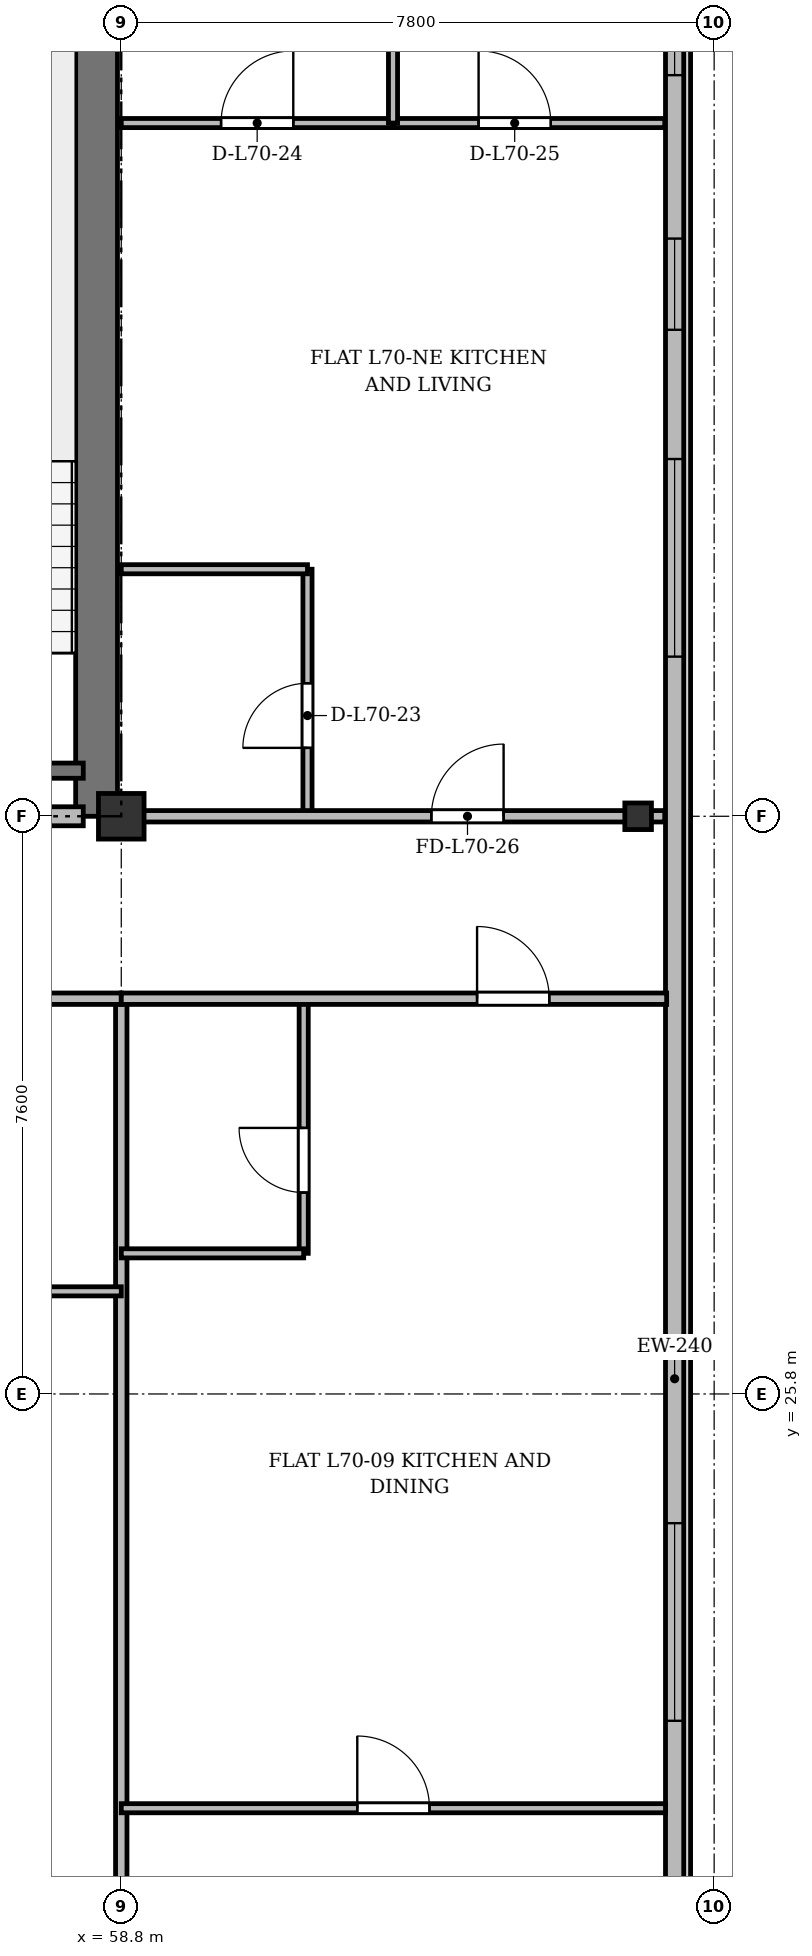
"""IFC4 building model, lengths in metres.
Left out: names, types, materials, properties, quantities, classifications, styles, units other than length and angle.
Written with IfcOpenShell. Run it as: python <this file> out.ifc"""

import sys

from ifc_helpers import new_model, si_unit, direction, frame, frame_2d, origin, origin_2d, place, context, subcontext, project, spatial, rectangle, i_section, extrude, source, transform, mapped, element, fill, save


model = new_model("IFC4")
c1 = context("Model", 3, precision=1e-05, world=origin(), true_north=direction((0.0, 1.0)))
c2 = subcontext(c1, "Body", "Model", "MODEL_VIEW")
j1 = project(units=[si_unit("LENGTHUNIT", "METRE"), si_unit("PLANEANGLEUNIT", "RADIAN")], contexts=[c1])
p1 = place(None, origin())
s1 = spatial("IfcSite", under=j1, at=p1, CompositionType="ELEMENT")
p2 = place(p1, origin())
s2 = spatial("IfcBuilding", under=s1, at=p2, CompositionType="ELEMENT")
p3 = place(p2, frame((0.0, 0.0, 270.3)))
s3 = spatial("IfcBuildingStorey", under=s2, at=p3, CompositionType="ELEMENT", Elevation=270.3)
m1 = source(origin(), c2, "Body", "SweptSolid", [
    extrude(rectangle(XDim=0.6, YDim=0.6, at=origin_2d()), origin(), (0.0, 0.0, 1.0), 3.6),
])
p4 = place(p3, frame((58.8, 33.4, 0.0), z_axis=(0.0, 0.0, 1.0), x_axis=(1.0, 0.0, 0.0)))
e1 = element("IfcColumn", 1, at=p4, inside=s3, PredefinedType="COLUMN", context=c2, shape_type="MappedRepresentation", body=[
    mapped(m1, transform((0.0, 0.0, 0.0), x_axis=(1.0, 0.0, 0.0), y_axis=(0.0, 1.0, 0.0), z_axis=(0.0, 0.0, 1.0), scale=1.0)),
])
m2 = source(origin(), c2, "Body", "SweptSolid", [
    extrude(i_section(OverallWidth=0.35, OverallDepth=0.35, WebThickness=0.018, FlangeThickness=0.028, at=origin_2d()), origin(), (0.0, 0.0, 1.0), 3.6),
])
p5 = place(p3, frame((65.6, 33.4, 0.0), z_axis=(0.0, 0.0, 1.0), x_axis=(1.0, 0.0, 0.0)))
e2 = element("IfcColumn", 2, at=p5, inside=s3, PredefinedType="COLUMN", context=c2, shape_type="MappedRepresentation", body=[
    mapped(m2, transform((0.0, 0.0, 0.0), x_axis=(1.0, 0.0, 0.0), y_axis=(0.0, 1.0, 0.0), z_axis=(0.0, 0.0, 1.0), scale=1.0)),
])
p6 = place(p3, frame((66.08, 45.5, 0.0), z_axis=(0.0, 0.0, 1.0), x_axis=(0.0, -1.0, 0.0)))
e3 = element("IfcWall", 3, at=p6, inside=s3, PredefinedType="SOLIDWALL", context=c2, shape_type="SweptSolid", body=[
    extrude(rectangle(XDim=39.0, YDim=0.24, at=frame_2d((19.5, 0.0))), origin(), (0.0, 0.0, 1.0), 3.37),
])
p7 = place(p6, frame((36.35, 0.0, 0.92)))
e4 = element("IfcOpeningElement", 4, at=p7, cuts=e3, PredefinedType="OPENING", context=c2, shape_type="SweptSolid", body=[
    extrude(rectangle(XDim=1.2, YDim=1.65, at=frame_2d((0.6, 0.825))), frame((0.0, 0.13, 0.0), z_axis=(0.0, -1.0, 0.0), x_axis=(1.0, 0.0, 0.0)), (0.0, 0.0, 1.0), 0.26),
])
p8 = place(p6, frame((32.8, 0.0, 0.92)))
e5 = element("IfcOpeningElement", 5, at=p8, cuts=e3, PredefinedType="OPENING", context=c2, shape_type="SweptSolid", body=[
    extrude(rectangle(XDim=2.6, YDim=1.9, at=frame_2d((1.3, 0.95))), frame((0.0, 0.13, 0.0), z_axis=(0.0, -1.0, 0.0), x_axis=(1.0, 0.0, 0.0)), (0.0, 0.0, 1.0), 0.26),
])
p9 = place(p6, frame((28.6, 0.0, 0.92)))
e6 = element("IfcOpeningElement", 6, at=p9, cuts=e3, PredefinedType="OPENING", context=c2, shape_type="SweptSolid", body=[
    extrude(rectangle(XDim=2.6, YDim=1.9, at=frame_2d((1.3, 0.95))), frame((0.0, 0.13, 0.0), z_axis=(0.0, -1.0, 0.0), x_axis=(1.0, 0.0, 0.0)), (0.0, 0.0, 1.0), 0.26),
])
p10 = place(p6, frame((21.4, 0.0, 0.92)))
e7 = element("IfcOpeningElement", 7, at=p10, cuts=e3, PredefinedType="OPENING", context=c2, shape_type="SweptSolid", body=[
    extrude(rectangle(XDim=2.6, YDim=1.9, at=frame_2d((1.3, 0.95))), frame((0.0, 0.13, 0.0), z_axis=(0.0, -1.0, 0.0), x_axis=(1.0, 0.0, 0.0)), (0.0, 0.0, 1.0), 0.26),
])
p11 = place(p6, frame((7.4, 0.0, 0.92)))
e8 = element("IfcOpeningElement", 8, at=p11, cuts=e3, PredefinedType="OPENING", context=c2, shape_type="SweptSolid", body=[
    extrude(rectangle(XDim=2.6, YDim=1.9, at=frame_2d((1.3, 0.95))), frame((0.0, 0.13, 0.0), z_axis=(0.0, -1.0, 0.0), x_axis=(1.0, 0.0, 0.0)), (0.0, 0.0, 1.0), 0.26),
])
p12 = place(p6, frame((4.5, 0.0, 0.92)))
e9 = element("IfcOpeningElement", 9, at=p12, cuts=e3, PredefinedType="OPENING", context=c2, shape_type="SweptSolid", body=[
    extrude(rectangle(XDim=1.2, YDim=1.65, at=frame_2d((0.6, 0.825))), frame((0.0, 0.13, 0.0), z_axis=(0.0, -1.0, 0.0), x_axis=(1.0, 0.0, 0.0)), (0.0, 0.0, 1.0), 0.26),
])
p13 = place(p6, frame((1.15, 0.0, 0.92)))
e10 = element("IfcOpeningElement", 10, at=p13, cuts=e3, PredefinedType="OPENING", context=c2, shape_type="SweptSolid", body=[
    extrude(rectangle(XDim=1.2, YDim=1.65, at=frame_2d((0.6, 0.825))), frame((0.0, 0.13, 0.0), z_axis=(0.0, -1.0, 0.0), x_axis=(1.0, 0.0, 0.0)), (0.0, 0.0, 1.0), 0.26),
])
p14 = place(p3, frame((58.475, 33.4, 0.0), z_axis=(0.0, 0.0, 1.0), x_axis=(0.0, 1.0, 0.0)))
e11 = element("IfcWall", 11, at=p14, inside=s3, PredefinedType="SHEAR", context=c2, shape_type="SweptSolid", body=[
    extrude(rectangle(XDim=11.55, YDim=0.55, at=frame_2d((5.775, 0.0))), origin(), (0.0, 0.0, 1.0), 3.37),
])
p15 = place(p3, frame((54.9, 34.0, 0.0), z_axis=(0.0, 0.0, 1.0), x_axis=(1.0, 0.0, 0.0)))
e12 = element("IfcWall", 12, at=p15, inside=s3, PredefinedType="SHEAR", context=c2, shape_type="SweptSolid", body=[
    extrude(rectangle(XDim=3.4, YDim=0.2, at=frame_2d((1.7, 0.0))), origin(), (0.0, 0.0, 1.0), 3.37),
])
p16 = place(p3, frame((47.15, 33.4, 0.0), z_axis=(0.0, 0.0, 1.0), x_axis=(1.0, 0.0, 0.0)))
e13 = element("IfcWall", 13, at=p16, inside=s3, PredefinedType="PARTITIONING", context=c2, shape_type="SweptSolid", body=[
    extrude(rectangle(XDim=11.15, YDim=0.25, at=frame_2d((5.575, 0.0))), origin(), (0.0, 0.0, 1.0), 2.92),
])
p17 = place(p16, frame((0.7, 0.0, 0.0)))
e14 = element("IfcOpeningElement", 14, at=p17, cuts=e13, PredefinedType="OPENING", context=c2, shape_type="SweptSolid", body=[
    extrude(rectangle(XDim=0.95, YDim=2.15, at=frame_2d((0.475, 1.075))), frame((0.0, 0.135, 0.0), z_axis=(0.0, -1.0, 0.0), x_axis=(1.0, 0.0, 0.0)), (0.0, 0.0, 1.0), 0.27),
])
p18 = place(p16, frame((6.0, 0.0, 0.0)))
e15 = element("IfcOpeningElement", 15, at=p18, cuts=e13, PredefinedType="OPENING", context=c2, shape_type="SweptSolid", body=[
    extrude(rectangle(XDim=1.2, YDim=2.15, at=frame_2d((0.6, 1.075))), frame((0.0, 0.135, 0.0), z_axis=(0.0, -1.0, 0.0), x_axis=(1.0, 0.0, 0.0)), (0.0, 0.0, 1.0), 0.27),
])
p19 = place(p3, frame((61.25, 33.4, 0.0), z_axis=(0.0, 0.0, 1.0), x_axis=(0.0, 1.0, 0.0)))
e16 = element("IfcWall", 16, at=p19, inside=s3, PredefinedType="PARTITIONING", context=c2, shape_type="SweptSolid", body=[
    extrude(rectangle(XDim=3.25, YDim=0.12, at=frame_2d((1.625, 0.0))), origin(), (0.0, 0.0, 1.0), 2.92),
])
p20 = place(p19, frame((0.9, 0.0, 0.0)))
e17 = element("IfcOpeningElement", 17, at=p20, cuts=e16, PredefinedType="OPENING", context=c2, shape_type="SweptSolid", body=[
    extrude(rectangle(XDim=0.85, YDim=2.1, at=frame_2d((0.425, 1.05))), frame((0.0, 0.07, 0.0), z_axis=(0.0, -1.0, 0.0), x_axis=(1.0, 0.0, 0.0)), (0.0, 0.0, 1.0), 0.14),
])
p21 = place(p3, frame((58.8, 36.65, 0.0), z_axis=(0.0, 0.0, 1.0), x_axis=(1.0, 0.0, 0.0)))
e18 = element("IfcWall", 18, at=p21, inside=s3, PredefinedType="PARTITIONING", context=c2, shape_type="SweptSolid", body=[
    extrude(rectangle(XDim=2.45, YDim=0.12, at=frame_2d((1.225, 0.0))), origin(), (0.0, 0.0, 1.0), 2.87),
])
p22 = place(p3, frame((58.8, 42.52, 0.0), z_axis=(0.0, 0.0, 1.0), x_axis=(1.0, 0.0, 0.0)))
e19 = element("IfcWall", 19, at=p22, inside=s3, PredefinedType="PARTITIONING", context=c2, shape_type="SweptSolid", body=[
    extrude(rectangle(XDim=3.575, YDim=0.12, at=frame_2d((1.788, 0.0))), origin(), (0.0, 0.0, 1.0), 2.87),
])
p23 = place(p22, frame((1.313, 0.0, 0.0)))
e20 = element("IfcOpeningElement", 20, at=p23, cuts=e19, PredefinedType="OPENING", context=c2, shape_type="SweptSolid", body=[
    extrude(rectangle(XDim=0.95, YDim=2.15, at=frame_2d((0.475, 1.075))), frame((0.0, 0.07, 0.0), z_axis=(0.0, -1.0, 0.0), x_axis=(1.0, 0.0, 0.0)), (0.0, 0.0, 1.0), 0.14),
])
p24 = place(p3, frame((62.375, 42.52, 0.0), z_axis=(0.0, 0.0, 1.0), x_axis=(1.0, 0.0, 0.0)))
e21 = element("IfcWall", 21, at=p24, inside=s3, PredefinedType="PARTITIONING", context=c2, shape_type="SweptSolid", body=[
    extrude(rectangle(XDim=3.575, YDim=0.12, at=frame_2d((1.788, 0.0))), origin(), (0.0, 0.0, 1.0), 2.87),
])
p25 = place(p24, frame((1.126, 0.0, 0.0)))
e22 = element("IfcOpeningElement", 22, at=p25, cuts=e21, PredefinedType="OPENING", context=c2, shape_type="SweptSolid", body=[
    extrude(rectangle(XDim=0.95, YDim=2.15, at=frame_2d((0.475, 1.075))), frame((0.0, 0.07, 0.0), z_axis=(0.0, -1.0, 0.0), x_axis=(1.0, 0.0, 0.0)), (0.0, 0.0, 1.0), 0.14),
])
p26 = place(p3, frame((62.375, 42.52, 0.0), z_axis=(0.0, 0.0, 1.0), x_axis=(0.0, 1.0, 0.0)))
e23 = element("IfcWall", 23, at=p26, inside=s3, PredefinedType="PARTITIONING", context=c2, shape_type="SweptSolid", body=[
    extrude(rectangle(XDim=5.74, YDim=0.12, at=frame_2d((2.87, 0.0))), origin(), (0.0, 0.0, 1.0), 2.92),
])
p27 = place(p3, frame((58.8, 33.4, 0.0), z_axis=(0.0, 0.0, 1.0), x_axis=(1.0, 0.0, 0.0)))
e24 = element("IfcWall", 24, at=p27, inside=s3, PredefinedType="PARTITIONING", context=c2, shape_type="SweptSolid", body=[
    extrude(rectangle(XDim=7.15, YDim=0.15, at=frame_2d((3.575, 0.0))), origin(), (0.0, 0.0, 1.0), 2.92),
])
p28 = place(p27, frame((4.08, 0.0, 0.0)))
e25 = element("IfcOpeningElement", 25, at=p28, cuts=e24, PredefinedType="OPENING", context=c2, shape_type="SweptSolid", body=[
    extrude(rectangle(XDim=0.95, YDim=2.15, at=frame_2d((0.475, 1.075))), frame((0.0, 0.085, 0.0), z_axis=(0.0, -1.0, 0.0), x_axis=(1.0, 0.0, 0.0)), (0.0, 0.0, 1.0), 0.17),
])
p29 = place(p3, frame((58.8, 3.725, 0.0), z_axis=(0.0, 0.0, 1.0), x_axis=(0.0, 1.0, 0.0)))
e26 = element("IfcWall", 26, at=p29, inside=s3, PredefinedType="PARTITIONING", context=c2, shape_type="SweptSolid", body=[
    extrude(rectangle(XDim=27.275, YDim=0.15, at=frame_2d((13.637, 0.0))), origin(), (0.0, 0.0, 1.0), 2.87),
])
p30 = place(p3, frame((55.2, 31.0, 0.0), z_axis=(0.0, 0.0, 1.0), x_axis=(1.0, 0.0, 0.0)))
e27 = element("IfcWall", 27, at=p30, inside=s3, PredefinedType="PARTITIONING", context=c2, shape_type="SweptSolid", body=[
    extrude(rectangle(XDim=3.6, YDim=0.15, at=frame_2d((1.8, 0.0))), origin(), (0.0, 0.0, 1.0), 2.87),
])
p31 = place(p30, frame((1.325, 0.0, 0.0)))
e28 = element("IfcOpeningElement", 28, at=p31, cuts=e27, PredefinedType="OPENING", context=c2, shape_type="SweptSolid", body=[
    extrude(rectangle(XDim=0.95, YDim=2.15, at=frame_2d((0.475, 1.075))), frame((0.0, 0.085, 0.0), z_axis=(0.0, -1.0, 0.0), x_axis=(1.0, 0.0, 0.0)), (0.0, 0.0, 1.0), 0.17),
])
p32 = place(p3, frame((55.2, 27.15, 0.0), z_axis=(0.0, 0.0, 1.0), x_axis=(1.0, 0.0, 0.0)))
e29 = element("IfcWall", 29, at=p32, inside=s3, PredefinedType="PARTITIONING", context=c2, shape_type="SweptSolid", body=[
    extrude(rectangle(XDim=3.6, YDim=0.12, at=frame_2d((1.8, 0.0))), origin(), (0.0, 0.0, 1.0), 2.87),
])
p33 = place(p32, frame((1.325, 0.0, 0.0)))
e30 = element("IfcOpeningElement", 30, at=p33, cuts=e29, PredefinedType="OPENING", context=c2, shape_type="SweptSolid", body=[
    extrude(rectangle(XDim=0.95, YDim=2.15, at=frame_2d((0.475, 1.075))), frame((0.0, 0.07, 0.0), z_axis=(0.0, -1.0, 0.0), x_axis=(1.0, 0.0, 0.0)), (0.0, 0.0, 1.0), 0.14),
])
p34 = place(p3, frame((58.8, 20.35, 0.0), z_axis=(0.0, 0.0, 1.0), x_axis=(1.0, 0.0, 0.0)))
e31 = element("IfcWall", 31, at=p34, inside=s3, PredefinedType="PARTITIONING", context=c2, shape_type="SweptSolid", body=[
    extrude(rectangle(XDim=7.16, YDim=0.12, at=frame_2d((3.58, 0.0))), origin(), (0.0, 0.0, 1.0), 2.87),
])
p35 = place(p34, frame((3.105, 0.0, 0.0)))
e32 = element("IfcOpeningElement", 32, at=p35, cuts=e31, PredefinedType="OPENING", context=c2, shape_type="SweptSolid", body=[
    extrude(rectangle(XDim=0.95, YDim=2.15, at=frame_2d((0.475, 1.075))), frame((0.0, 0.07, 0.0), z_axis=(0.0, -1.0, 0.0), x_axis=(1.0, 0.0, 0.0)), (0.0, 0.0, 1.0), 0.14),
])
p36 = place(p3, frame((61.2, 27.65, 0.0), z_axis=(0.0, 0.0, 1.0), x_axis=(0.0, 1.0, 0.0)))
e33 = element("IfcWall", 33, at=p36, inside=s3, PredefinedType="PARTITIONING", context=c2, shape_type="SweptSolid", body=[
    extrude(rectangle(XDim=3.35, YDim=0.12, at=frame_2d((1.675, 0.0))), origin(), (0.0, 0.0, 1.0), 3.37),
])
p37 = place(p36, frame((0.8, 0.0, 0.0)))
e34 = element("IfcOpeningElement", 34, at=p37, cuts=e33, PredefinedType="OPENING", context=c2, shape_type="SweptSolid", body=[
    extrude(rectangle(XDim=0.85, YDim=2.1, at=frame_2d((0.425, 1.05))), frame((0.0, 0.07, 0.0), z_axis=(0.0, -1.0, 0.0), x_axis=(1.0, 0.0, 0.0)), (0.0, 0.0, 1.0), 0.14),
])
p38 = place(p3, frame((58.8, 27.65, 0.0), z_axis=(0.0, 0.0, 1.0), x_axis=(1.0, 0.0, 0.0)))
e35 = element("IfcWall", 35, at=p38, inside=s3, PredefinedType="PARTITIONING", context=c2, shape_type="SweptSolid", body=[
    extrude(rectangle(XDim=2.4, YDim=0.12, at=frame_2d((1.2, 0.0))), origin(), (0.0, 0.0, 1.0), 2.87),
])
p39 = place(p3, frame((58.8, 31.0, 0.0), z_axis=(0.0, 0.0, 1.0), x_axis=(1.0, 0.0, 0.0)))
e36 = element("IfcWall", 36, at=p39, inside=s3, PredefinedType="PARTITIONING", context=c2, shape_type="SweptSolid", body=[
    extrude(rectangle(XDim=7.175, YDim=0.15, at=frame_2d((3.587, 0.0))), origin(), (0.0, 0.0, 1.0), 2.87),
])
p40 = place(p39, frame((4.681, 0.0, 0.0)))
e37 = element("IfcOpeningElement", 37, at=p40, cuts=e36, PredefinedType="OPENING", context=c2, shape_type="SweptSolid", body=[
    extrude(rectangle(XDim=0.95, YDim=2.15, at=frame_2d((0.475, 1.075))), frame((0.0, 0.085, 0.0), z_axis=(0.0, -1.0, 0.0), x_axis=(1.0, 0.0, 0.0)), (0.0, 0.0, 1.0), 0.17),
])
m3 = source(origin(), c2, "Body", "SweptSolid", [
    extrude(rectangle(XDim=2.6, YDim=1.9, at=frame_2d((1.3, 0.95))), frame((0.0, 0.03, 0.0), z_axis=(0.0, -1.0, 0.0), x_axis=(1.0, 0.0, 0.0)), (0.0, 0.0, 1.0), 0.06),
])
p41 = place(p10, origin())
e38 = element("IfcWindow", 38, at=p41, inside=s3, PartitioningType="SINGLE_PANEL", PredefinedType="WINDOW", context=c2, shape_type="MappedRepresentation", body=[
    mapped(m3, transform((0.0, 0.0, 0.0), x_axis=(1.0, 0.0, 0.0), y_axis=(0.0, 1.0, 0.0), z_axis=(0.0, 0.0, 1.0), scale=1.0)),
])
fill(e7, e38)
p42 = place(p11, origin())
e39 = element("IfcWindow", 39, at=p42, inside=s3, PartitioningType="SINGLE_PANEL", PredefinedType="WINDOW", context=c2, shape_type="MappedRepresentation", body=[
    mapped(m3, transform((0.0, 0.0, 0.0), x_axis=(1.0, 0.0, 0.0), y_axis=(0.0, 1.0, 0.0), z_axis=(0.0, 0.0, 1.0), scale=1.0)),
])
fill(e8, e39)
m4 = source(origin(), c2, "Body", "SweptSolid", [
    extrude(rectangle(XDim=1.2, YDim=1.65, at=frame_2d((0.6, 0.825))), frame((0.0, 0.03, 0.0), z_axis=(0.0, -1.0, 0.0), x_axis=(1.0, 0.0, 0.0)), (0.0, 0.0, 1.0), 0.06),
])
p43 = place(p12, origin())
e40 = element("IfcWindow", 40, at=p43, inside=s3, PartitioningType="SINGLE_PANEL", PredefinedType="WINDOW", context=c2, shape_type="MappedRepresentation", body=[
    mapped(m4, transform((0.0, 0.0, 0.0), x_axis=(1.0, 0.0, 0.0), y_axis=(0.0, 1.0, 0.0), z_axis=(0.0, 0.0, 1.0), scale=1.0)),
])
fill(e9, e40)
p44 = place(p13, origin())
e41 = element("IfcWindow", 41, at=p44, inside=s3, PartitioningType="SINGLE_PANEL", PredefinedType="WINDOW", context=c2, shape_type="MappedRepresentation", body=[
    mapped(m4, transform((0.0, 0.0, 0.0), x_axis=(1.0, 0.0, 0.0), y_axis=(0.0, 1.0, 0.0), z_axis=(0.0, 0.0, 1.0), scale=1.0)),
])
fill(e10, e41)
m5 = source(origin(), c2, "Body", "SweptSolid", [
    extrude(rectangle(XDim=0.85, YDim=2.1, at=frame_2d((0.425, 1.05))), frame((0.0, 0.025, 0.0), z_axis=(0.0, -1.0, 0.0), x_axis=(1.0, 0.0, 0.0)), (0.0, 0.0, 1.0), 0.05),
])
p45 = place(p20, origin())
e42 = element("IfcDoor", 42, at=p45, inside=s3, OperationType="SINGLE_SWING_LEFT", PredefinedType="DOOR", context=c2, shape_type="MappedRepresentation", body=[
    mapped(m5, transform((0.0, 0.0, 0.0), x_axis=(1.0, 0.0, 0.0), y_axis=(0.0, 1.0, 0.0), z_axis=(0.0, 0.0, 1.0), scale=1.0)),
])
fill(e17, e42)
m6 = source(origin(), c2, "Body", "SweptSolid", [
    extrude(rectangle(XDim=0.95, YDim=2.15, at=frame_2d((0.475, 1.075))), frame((0.0, 0.025, 0.0), z_axis=(0.0, -1.0, 0.0), x_axis=(1.0, 0.0, 0.0)), (0.0, 0.0, 1.0), 0.05),
])
p46 = place(p23, origin())
e43 = element("IfcDoor", 43, at=p46, inside=s3, OperationType="SINGLE_SWING_RIGHT", PredefinedType="DOOR", context=c2, shape_type="MappedRepresentation", body=[
    mapped(m6, transform((0.0, 0.0, 0.0), x_axis=(1.0, 0.0, 0.0), y_axis=(0.0, 1.0, 0.0), z_axis=(0.0, 0.0, 1.0), scale=1.0)),
])
fill(e20, e43)
p47 = place(p25, origin())
e44 = element("IfcDoor", 44, at=p47, inside=s3, OperationType="SINGLE_SWING_LEFT", PredefinedType="DOOR", context=c2, shape_type="MappedRepresentation", body=[
    mapped(m6, transform((0.0, 0.0, 0.0), x_axis=(1.0, 0.0, 0.0), y_axis=(0.0, 1.0, 0.0), z_axis=(0.0, 0.0, 1.0), scale=1.0)),
])
fill(e22, e44)
p48 = place(p28, origin())
e45 = element("IfcDoor", 45, at=p48, inside=s3, OperationType="SINGLE_SWING_RIGHT", PredefinedType="DOOR", context=c2, shape_type="MappedRepresentation", body=[
    mapped(m6, transform((0.0, 0.0, 0.0), x_axis=(1.0, 0.0, 0.0), y_axis=(0.0, 1.0, 0.0), z_axis=(0.0, 0.0, 1.0), scale=1.0)),
])
fill(e25, e45)
p49 = place(p35, origin())
e46 = element("IfcDoor", 46, at=p49, inside=s3, OperationType="SINGLE_SWING_LEFT", PredefinedType="DOOR", context=c2, shape_type="MappedRepresentation", body=[
    mapped(m6, transform((0.0, 0.0, 0.0), x_axis=(1.0, 0.0, 0.0), y_axis=(0.0, 1.0, 0.0), z_axis=(0.0, 0.0, 1.0), scale=1.0)),
])
fill(e32, e46)
p50 = place(p37, origin())
e47 = element("IfcDoor", 47, at=p50, inside=s3, OperationType="SINGLE_SWING_RIGHT", PredefinedType="DOOR", context=c2, shape_type="MappedRepresentation", body=[
    mapped(m5, transform((0.0, 0.0, 0.0), x_axis=(1.0, 0.0, 0.0), y_axis=(0.0, 1.0, 0.0), z_axis=(0.0, 0.0, 1.0), scale=1.0)),
])
fill(e34, e47)
p51 = place(p40, origin())
e48 = element("IfcDoor", 48, at=p51, inside=s3, OperationType="SINGLE_SWING_LEFT", PredefinedType="DOOR", context=c2, shape_type="MappedRepresentation", body=[
    mapped(m6, transform((0.0, 0.0, 0.0), x_axis=(1.0, 0.0, 0.0), y_axis=(0.0, 1.0, 0.0), z_axis=(0.0, 0.0, 1.0), scale=1.0)),
])
fill(e37, e48)
save(model, sys.argv[1])
